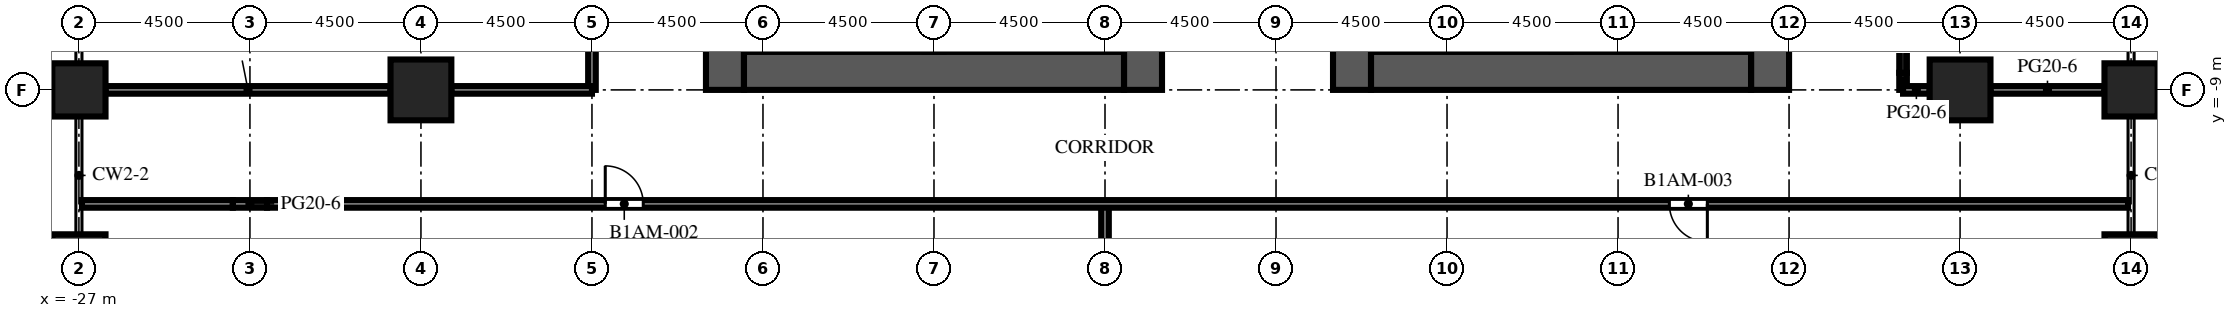
"""IFC4 building model, lengths in metres.
Left out: names, types, materials, properties, quantities, classifications, styles, units other than length and angle.
Written with IfcOpenShell. Run it as: python <this file> out.ifc"""

import sys

from ifc_helpers import new_model, si_unit, direction, frame, frame_2d, origin, origin_2d, place, context, subcontext, project, spatial, rectangle, extrude, element, fill, save


model = new_model("IFC4")
c1 = context("Model", 3, precision=1e-05, world=origin(), true_north=direction((0.0, 1.0)))
c2 = subcontext(c1, "Body", "Model", "MODEL_VIEW")
j1 = project(units=[si_unit("LENGTHUNIT", "METRE"), si_unit("PLANEANGLEUNIT", "RADIAN")], contexts=[c1])
p1 = place(None, origin())
s1 = spatial("IfcSite", under=j1, at=p1, CompositionType="ELEMENT")
p2 = place(p1, origin())
s2 = spatial("IfcBuilding", under=s1, at=p2, CompositionType="ELEMENT")
p3 = place(p2, frame((0.0, 0.0, 35.9)))
s3 = spatial("IfcBuildingStorey", under=s2, at=p3, CompositionType="ELEMENT", Elevation=35.9)
p4 = place(p3, frame((-27.0, -13.5, 0.0), z_axis=(0.0, 0.0, 1.0), x_axis=(1.0, 0.0, 0.0)))
e1 = element("IfcColumn", 1, at=p4, inside=s3, PredefinedType="COLUMN", context=c2, shape_type="SweptSolid", body=[
    extrude(rectangle(XDim=1.4, YDim=1.4, at=origin_2d()), origin(), (0.0, 0.0, 1.0), 6.0),
])
p5 = place(p3, frame((-27.0, -9.0, 0.0), z_axis=(0.0, 0.0, 1.0), x_axis=(1.0, 0.0, 0.0)))
e2 = element("IfcColumn", 2, at=p5, inside=s3, PredefinedType="COLUMN", context=c2, shape_type="SweptSolid", body=[
    extrude(rectangle(XDim=1.4, YDim=1.4, at=origin_2d()), origin(), (0.0, 0.0, 1.0), 3.75),
])
p6 = place(p3, frame((27.0, -13.5, 0.0), z_axis=(0.0, 0.0, 1.0), x_axis=(1.0, 0.0, 0.0)))
e3 = element("IfcColumn", 3, at=p6, inside=s3, PredefinedType="COLUMN", context=c2, shape_type="SweptSolid", body=[
    extrude(rectangle(XDim=1.4, YDim=1.4, at=origin_2d()), origin(), (0.0, 0.0, 1.0), 6.0),
])
p7 = place(p3, frame((27.0, -9.0, 0.0), z_axis=(0.0, 0.0, 1.0), x_axis=(1.0, 0.0, 0.0)))
e4 = element("IfcColumn", 4, at=p7, inside=s3, PredefinedType="COLUMN", context=c2, shape_type="SweptSolid", body=[
    extrude(rectangle(XDim=1.4, YDim=1.4, at=origin_2d()), origin(), (0.0, 0.0, 1.0), 5.55),
])
for number, where, z_axis, x_axis in (
    (5, (-18.0, -9.0, 0.0), (0.0, 0.0, 1.0), (1.0, 0.0, 0.0)),
    (6, (22.5, -9.0, 0.0), (0.0, 0.0, 1.0), (1.0, 0.0, 0.0)),
):
    element("IfcColumn", number, at=place(p3, frame(where, z_axis=z_axis, x_axis=x_axis)), inside=s3, PredefinedType="COLUMN", context=c2, shape_type="SweptSolid", body=[
        extrude(rectangle(XDim=1.6, YDim=1.6, at=origin_2d()), origin(), (0.0, 0.0, 1.0), 5.55),
    ])
p8 = place(p3, frame((-10.0, -9.0, 0.0), z_axis=(0.0, 0.0, 1.0), x_axis=(0.0, 1.0, 0.0)))
e7 = element("IfcWall", 7, at=p8, inside=s3, PredefinedType="SHEAR", context=c2, shape_type="SweptSolid", body=[
    extrude(rectangle(XDim=27.5, YDim=1.0, at=frame_2d((13.75, 0.0))), origin(), (0.0, 0.0, 1.0), 6.0),
])
p9 = place(p8, frame((12.55, 0.0, 0.0)))
e8 = element("IfcOpeningElement", 8, at=p9, cuts=e7, PredefinedType="OPENING", context=c2, shape_type="SweptSolid", body=[
    extrude(rectangle(XDim=2.4, YDim=2.4, at=frame_2d((1.2, 1.2))), frame((0.0, 0.51, 0.0), z_axis=(0.0, -1.0, 0.0), x_axis=(1.0, 0.0, 0.0)), (0.0, 0.0, 1.0), 1.02),
])
p10 = place(p8, frame((6.825, 0.0, 0.0)))
e9 = element("IfcOpeningElement", 9, at=p10, cuts=e7, PredefinedType="OPENING", context=c2, shape_type="SweptSolid", body=[
    extrude(rectangle(XDim=1.2, YDim=2.1, at=frame_2d((0.6, 1.05))), frame((0.0, 0.51, 0.0), z_axis=(0.0, -1.0, 0.0), x_axis=(1.0, 0.0, 0.0)), (0.0, 0.0, 1.0), 1.02),
])
p11 = place(p8, frame((19.475, 0.0, 0.0)))
e10 = element("IfcOpeningElement", 10, at=p11, cuts=e7, PredefinedType="OPENING", context=c2, shape_type="SweptSolid", body=[
    extrude(rectangle(XDim=1.2, YDim=2.1, at=frame_2d((0.6, 1.05))), frame((0.0, 0.51, 0.0), z_axis=(0.0, -1.0, 0.0), x_axis=(1.0, 0.0, 0.0)), (0.0, 0.0, 1.0), 1.02),
])
p12 = place(p3, frame((1.0, -9.0, 0.0), z_axis=(0.0, 0.0, 1.0), x_axis=(0.0, 1.0, 0.0)))
e11 = element("IfcWall", 11, at=p12, inside=s3, PredefinedType="SHEAR", context=c2, shape_type="SweptSolid", body=[
    extrude(rectangle(XDim=27.5, YDim=1.0, at=frame_2d((13.75, 0.0))), origin(), (0.0, 0.0, 1.0), 6.0),
])
p13 = place(p12, frame((12.55, 0.0, 0.0)))
e12 = element("IfcOpeningElement", 12, at=p13, cuts=e11, PredefinedType="OPENING", context=c2, shape_type="SweptSolid", body=[
    extrude(rectangle(XDim=2.4, YDim=2.4, at=frame_2d((1.2, 1.2))), frame((0.0, 0.51, 0.0), z_axis=(0.0, -1.0, 0.0), x_axis=(1.0, 0.0, 0.0)), (0.0, 0.0, 1.0), 1.02),
])
p14 = place(p12, frame((4.025, 0.0, 0.0)))
e13 = element("IfcOpeningElement", 13, at=p14, cuts=e11, PredefinedType="OPENING", context=c2, shape_type="SweptSolid", body=[
    extrude(rectangle(XDim=1.2, YDim=2.1, at=frame_2d((0.6, 1.05))), frame((0.0, 0.51, 0.0), z_axis=(0.0, -1.0, 0.0), x_axis=(1.0, 0.0, 0.0)), (0.0, 0.0, 1.0), 1.02),
])
p15 = place(p12, frame((19.475, 0.0, 0.0)))
e14 = element("IfcOpeningElement", 14, at=p15, cuts=e11, PredefinedType="OPENING", context=c2, shape_type="SweptSolid", body=[
    extrude(rectangle(XDim=1.0, YDim=2.1, at=frame_2d((0.5, 1.05))), frame((0.0, 0.51, 0.0), z_axis=(0.0, -1.0, 0.0), x_axis=(1.0, 0.0, 0.0)), (0.0, 0.0, 1.0), 1.02),
])
p16 = place(p12, frame((21.106, 0.0, 0.0)))
e15 = element("IfcOpeningElement", 15, at=p16, cuts=e11, PredefinedType="OPENING", context=c2, shape_type="SweptSolid", body=[
    extrude(rectangle(XDim=1.0, YDim=2.1, at=frame_2d((0.5, 1.05))), frame((0.0, 0.51, 0.0), z_axis=(0.0, -1.0, 0.0), x_axis=(1.0, 0.0, 0.0)), (0.0, 0.0, 1.0), 1.02),
])
p17 = place(p12, frame((23.1, 0.0, 0.0)))
e16 = element("IfcOpeningElement", 16, at=p17, cuts=e11, PredefinedType="OPENING", context=c2, shape_type="SweptSolid", body=[
    extrude(rectangle(XDim=1.0, YDim=2.1, at=frame_2d((0.5, 1.05))), frame((0.0, 0.51, 0.0), z_axis=(0.0, -1.0, 0.0), x_axis=(1.0, 0.0, 0.0)), (0.0, 0.0, 1.0), 1.02),
])
p18 = place(p12, frame((25.094, 0.0, 0.0)))
e17 = element("IfcOpeningElement", 17, at=p18, cuts=e11, PredefinedType="OPENING", context=c2, shape_type="SweptSolid", body=[
    extrude(rectangle(XDim=1.0, YDim=2.1, at=frame_2d((0.5, 1.05))), frame((0.0, 0.51, 0.0), z_axis=(0.0, -1.0, 0.0), x_axis=(1.0, 0.0, 0.0)), (0.0, 0.0, 1.0), 1.02),
])
p19 = place(p3, frame((-9.5, -8.5, 0.0), z_axis=(0.0, 0.0, 1.0), x_axis=(1.0, 0.0, 0.0)))
e18 = element("IfcWall", 18, at=p19, inside=s3, PredefinedType="SHEAR", context=c2, shape_type="SweptSolid", body=[
    extrude(rectangle(XDim=10.0, YDim=1.0, at=frame_2d((5.0, 0.0))), origin(), (0.0, 0.0, 1.0), 6.0),
])
p20 = place(p3, frame((6.5, -9.0, 0.0), z_axis=(0.0, 0.0, 1.0), x_axis=(0.0, 1.0, 0.0)))
e19 = element("IfcWall", 19, at=p20, inside=s3, PredefinedType="SHEAR", context=c2, shape_type="SweptSolid", body=[
    extrude(rectangle(XDim=27.5, YDim=1.0, at=frame_2d((13.75, 0.0))), origin(), (0.0, 0.0, 1.0), 6.0),
])
p21 = place(p20, frame((12.55, 0.0, 0.0)))
e20 = element("IfcOpeningElement", 20, at=p21, cuts=e19, PredefinedType="OPENING", context=c2, shape_type="SweptSolid", body=[
    extrude(rectangle(XDim=2.4, YDim=2.4, at=frame_2d((1.2, 1.2))), frame((0.0, 0.51, 0.0), z_axis=(0.0, -1.0, 0.0), x_axis=(1.0, 0.0, 0.0)), (0.0, 0.0, 1.0), 1.02),
])
p22 = place(p20, frame((4.025, 0.0, 0.0)))
e21 = element("IfcOpeningElement", 21, at=p22, cuts=e19, PredefinedType="OPENING", context=c2, shape_type="SweptSolid", body=[
    extrude(rectangle(XDim=1.2, YDim=2.1, at=frame_2d((0.6, 1.05))), frame((0.0, 0.51, 0.0), z_axis=(0.0, -1.0, 0.0), x_axis=(1.0, 0.0, 0.0)), (0.0, 0.0, 1.0), 1.02),
])
p23 = place(p20, frame((19.475, 0.0, 0.0)))
e22 = element("IfcOpeningElement", 22, at=p23, cuts=e19, PredefinedType="OPENING", context=c2, shape_type="SweptSolid", body=[
    extrude(rectangle(XDim=1.0, YDim=2.1, at=frame_2d((0.5, 1.05))), frame((0.0, 0.51, 0.0), z_axis=(0.0, -1.0, 0.0), x_axis=(1.0, 0.0, 0.0)), (0.0, 0.0, 1.0), 1.02),
])
p24 = place(p20, frame((21.106, 0.0, 0.0)))
e23 = element("IfcOpeningElement", 23, at=p24, cuts=e19, PredefinedType="OPENING", context=c2, shape_type="SweptSolid", body=[
    extrude(rectangle(XDim=1.0, YDim=2.1, at=frame_2d((0.5, 1.05))), frame((0.0, 0.51, 0.0), z_axis=(0.0, -1.0, 0.0), x_axis=(1.0, 0.0, 0.0)), (0.0, 0.0, 1.0), 1.02),
])
p25 = place(p20, frame((23.1, 0.0, 0.0)))
e24 = element("IfcOpeningElement", 24, at=p25, cuts=e19, PredefinedType="OPENING", context=c2, shape_type="SweptSolid", body=[
    extrude(rectangle(XDim=1.0, YDim=2.1, at=frame_2d((0.5, 1.05))), frame((0.0, 0.51, 0.0), z_axis=(0.0, -1.0, 0.0), x_axis=(1.0, 0.0, 0.0)), (0.0, 0.0, 1.0), 1.02),
])
p26 = place(p20, frame((25.094, 0.0, 0.0)))
e25 = element("IfcOpeningElement", 25, at=p26, cuts=e19, PredefinedType="OPENING", context=c2, shape_type="SweptSolid", body=[
    extrude(rectangle(XDim=1.0, YDim=2.1, at=frame_2d((0.5, 1.05))), frame((0.0, 0.51, 0.0), z_axis=(0.0, -1.0, 0.0), x_axis=(1.0, 0.0, 0.0)), (0.0, 0.0, 1.0), 1.02),
])
p27 = place(p3, frame((17.5, -9.0, 0.0), z_axis=(0.0, 0.0, 1.0), x_axis=(0.0, 1.0, 0.0)))
e26 = element("IfcWall", 26, at=p27, inside=s3, PredefinedType="SHEAR", context=c2, shape_type="SweptSolid", body=[
    extrude(rectangle(XDim=27.5, YDim=1.0, at=frame_2d((13.75, 0.0))), origin(), (0.0, 0.0, 1.0), 6.0),
])
p28 = place(p27, frame((12.55, 0.0, 0.0)))
e27 = element("IfcOpeningElement", 27, at=p28, cuts=e26, PredefinedType="OPENING", context=c2, shape_type="SweptSolid", body=[
    extrude(rectangle(XDim=2.4, YDim=2.4, at=frame_2d((1.2, 1.2))), frame((0.0, 0.51, 0.0), z_axis=(0.0, -1.0, 0.0), x_axis=(1.0, 0.0, 0.0)), (0.0, 0.0, 1.0), 1.02),
])
p29 = place(p27, frame((6.825, 0.0, 0.0)))
e28 = element("IfcOpeningElement", 28, at=p29, cuts=e26, PredefinedType="OPENING", context=c2, shape_type="SweptSolid", body=[
    extrude(rectangle(XDim=1.2, YDim=2.1, at=frame_2d((0.6, 1.05))), frame((0.0, 0.51, 0.0), z_axis=(0.0, -1.0, 0.0), x_axis=(1.0, 0.0, 0.0)), (0.0, 0.0, 1.0), 1.02),
])
p30 = place(p27, frame((19.475, 0.0, 0.0)))
e29 = element("IfcOpeningElement", 29, at=p30, cuts=e26, PredefinedType="OPENING", context=c2, shape_type="SweptSolid", body=[
    extrude(rectangle(XDim=1.2, YDim=2.1, at=frame_2d((0.6, 1.05))), frame((0.0, 0.51, 0.0), z_axis=(0.0, -1.0, 0.0), x_axis=(1.0, 0.0, 0.0)), (0.0, 0.0, 1.0), 1.02),
])
p31 = place(p3, frame((7.0, -8.5, 0.0), z_axis=(0.0, 0.0, 1.0), x_axis=(1.0, 0.0, 0.0)))
e30 = element("IfcWall", 30, at=p31, inside=s3, PredefinedType="SHEAR", context=c2, shape_type="SweptSolid", body=[
    extrude(rectangle(XDim=10.0, YDim=1.0, at=frame_2d((5.0, 0.0))), origin(), (0.0, 0.0, 1.0), 6.0),
])
p32 = place(p3, frame((-13.5, -9.0, 0.0), z_axis=(0.0, 0.0, 1.0), x_axis=(0.0, 1.0, 0.0)))
e31 = element("IfcWall", 31, at=p32, inside=s3, PredefinedType="PARTITIONING", context=c2, shape_type="SweptSolid", body=[
    extrude(rectangle(XDim=27.5, YDim=0.2, at=frame_2d((13.75, 0.0))), origin(), (0.0, 0.0, 1.0), 5.55),
])
p33 = place(p32, frame((10.1, 0.0, 0.0)))
e32 = element("IfcOpeningElement", 32, at=p33, cuts=e31, PredefinedType="OPENING", context=c2, shape_type="SweptSolid", body=[
    extrude(rectangle(XDim=1.0, YDim=2.1, at=frame_2d((0.5, 1.05))), frame((0.0, 0.11, 0.0), z_axis=(0.0, -1.0, 0.0), x_axis=(1.0, 0.0, 0.0)), (0.0, 0.0, 1.0), 0.22),
])
p34 = place(p3, frame((0.0, -17.2, 0.0), z_axis=(0.0, 0.0, 1.0), x_axis=(0.0, 1.0, 0.0)))
e33 = element("IfcWall", 33, at=p34, inside=s3, PredefinedType="PARTITIONING", context=c2, shape_type="SweptSolid", body=[
    extrude(rectangle(XDim=5.2, YDim=0.2, at=frame_2d((2.6, 0.0))), origin(), (0.0, 0.0, 1.0), 5.55),
])
p35 = place(p3, frame((21.0, -9.0, 0.0), z_axis=(0.0, 0.0, 1.0), x_axis=(0.0, 1.0, 0.0)))
e34 = element("IfcWall", 34, at=p35, inside=s3, PredefinedType="PARTITIONING", context=c2, shape_type="SweptSolid", body=[
    extrude(rectangle(XDim=0.45, YDim=0.2, at=frame_2d((0.225, 0.0))), origin(), (0.0, 0.0, 1.0), 3.72),
])
p36 = place(p3, frame((21.0, -8.55, 0.0), z_axis=(0.0, 0.0, 1.0), x_axis=(0.0, 1.0, 0.0)))
e35 = element("IfcWall", 35, at=p36, inside=s3, PredefinedType="PARTITIONING", context=c2, shape_type="SweptSolid", body=[
    extrude(rectangle(XDim=8.1, YDim=0.2, at=frame_2d((4.05, 0.0))), origin(), (0.0, 0.0, 1.0), 5.55),
])
p37 = place(p3, frame((-26.92, -12.0, 0.0), z_axis=(0.0, 0.0, 1.0), x_axis=(1.0, 0.0, 0.0)))
e36 = element("IfcWall", 36, at=p37, inside=s3, PredefinedType="PARTITIONING", context=c2, shape_type="SweptSolid", body=[
    extrude(rectangle(XDim=3.97, YDim=0.2, at=frame_2d((1.985, 0.0))), origin(), (0.0, 0.0, 1.0), 5.55),
])
p38 = place(p3, frame((-22.95, -12.0, 0.0), z_axis=(0.0, 0.0, 1.0), x_axis=(1.0, 0.0, 0.0)))
e37 = element("IfcWall", 37, at=p38, inside=s3, PredefinedType="PARTITIONING", context=c2, shape_type="SweptSolid", body=[
    extrude(rectangle(XDim=0.9, YDim=0.2, at=frame_2d((0.45, 0.0))), origin(), (0.0, 0.0, 1.0), 3.72),
])
p39 = place(p3, frame((26.92, -12.0, 0.0), z_axis=(0.0, 0.0, 1.0), x_axis=(-1.0, 0.0, 0.0)))
e38 = element("IfcWall", 38, at=p39, inside=s3, PredefinedType="PARTITIONING", context=c2, shape_type="SweptSolid", body=[
    extrude(rectangle(XDim=48.97, YDim=0.2, at=frame_2d((24.485, 0.0))), origin(), (0.0, 0.0, 1.0), 5.55),
])
p40 = place(p39, frame((39.07, 0.0, 0.0)))
e39 = element("IfcOpeningElement", 39, at=p40, cuts=e38, PredefinedType="OPENING", context=c2, shape_type="SweptSolid", body=[
    extrude(rectangle(XDim=1.0, YDim=2.1, at=frame_2d((0.5, 1.05))), frame((0.0, 0.11, 0.0), z_axis=(0.0, -1.0, 0.0), x_axis=(1.0, 0.0, 0.0)), (0.0, 0.0, 1.0), 0.22),
])
p41 = place(p39, frame((11.07, 0.0, 0.0)))
e40 = element("IfcOpeningElement", 40, at=p41, cuts=e38, PredefinedType="OPENING", context=c2, shape_type="SweptSolid", body=[
    extrude(rectangle(XDim=1.0, YDim=2.1, at=frame_2d((0.5, 1.05))), frame((0.0, 0.11, 0.0), z_axis=(0.0, -1.0, 0.0), x_axis=(1.0, 0.0, 0.0)), (0.0, 0.0, 1.0), 0.22),
])
p42 = place(p3, frame((-26.3, -9.0, 0.0), z_axis=(0.0, 0.0, 1.0), x_axis=(1.0, 0.0, 0.0)))
e41 = element("IfcWall", 41, at=p42, inside=s3, PredefinedType="PARTITIONING", context=c2, shape_type="SweptSolid", body=[
    extrude(rectangle(XDim=7.5, YDim=0.2, at=frame_2d((3.75, 0.0))), origin(), (0.0, 0.0, 1.0), 3.72),
])
p43 = place(p3, frame((-17.2, -9.0, 0.0), z_axis=(0.0, 0.0, 1.0), x_axis=(1.0, 0.0, 0.0)))
e42 = element("IfcWall", 42, at=p43, inside=s3, PredefinedType="PARTITIONING", context=c2, shape_type="SweptSolid", body=[
    extrude(rectangle(XDim=3.7, YDim=0.2, at=frame_2d((1.85, 0.0))), origin(), (0.0, 0.0, 1.0), 5.55),
])
p44 = place(p3, frame((21.0, -9.0, 0.0), z_axis=(0.0, 0.0, 1.0), x_axis=(1.0, 0.0, 0.0)))
e43 = element("IfcWall", 43, at=p44, inside=s3, PredefinedType="PARTITIONING", context=c2, shape_type="SweptSolid", body=[
    extrude(rectangle(XDim=0.7, YDim=0.2, at=frame_2d((0.35, 0.0))), origin(), (0.0, 0.0, 1.0), 3.72),
])
p45 = place(p3, frame((23.3, -9.0, 0.0), z_axis=(0.0, 0.0, 1.0), x_axis=(1.0, 0.0, 0.0)))
e44 = element("IfcWall", 44, at=p45, inside=s3, PredefinedType="PARTITIONING", context=c2, shape_type="SweptSolid", body=[
    extrude(rectangle(XDim=3.0, YDim=0.2, at=frame_2d((1.5, 0.0))), origin(), (0.0, 0.0, 1.0), 3.72),
])
p46 = place(p40, origin())
e45 = element("IfcDoor", 45, at=p46, inside=s3, OperationType="SINGLE_SWING_RIGHT", PredefinedType="DOOR", context=c2, shape_type="SweptSolid", body=[
    extrude(rectangle(XDim=1.0, YDim=2.1, at=frame_2d((0.5, 1.05))), frame((0.0, 0.025, 0.0), z_axis=(0.0, -1.0, 0.0), x_axis=(1.0, 0.0, 0.0)), (0.0, 0.0, 1.0), 0.05),
])
fill(e39, e45)
p47 = place(p41, origin())
e46 = element("IfcDoor", 46, at=p47, inside=s3, OperationType="SINGLE_SWING_LEFT", PredefinedType="DOOR", context=c2, shape_type="SweptSolid", body=[
    extrude(rectangle(XDim=1.0, YDim=2.1, at=frame_2d((0.5, 1.05))), frame((0.0, 0.025, 0.0), z_axis=(0.0, -1.0, 0.0), x_axis=(1.0, 0.0, 0.0)), (0.0, 0.0, 1.0), 0.05),
])
fill(e40, e46)
save(model, sys.argv[1])
